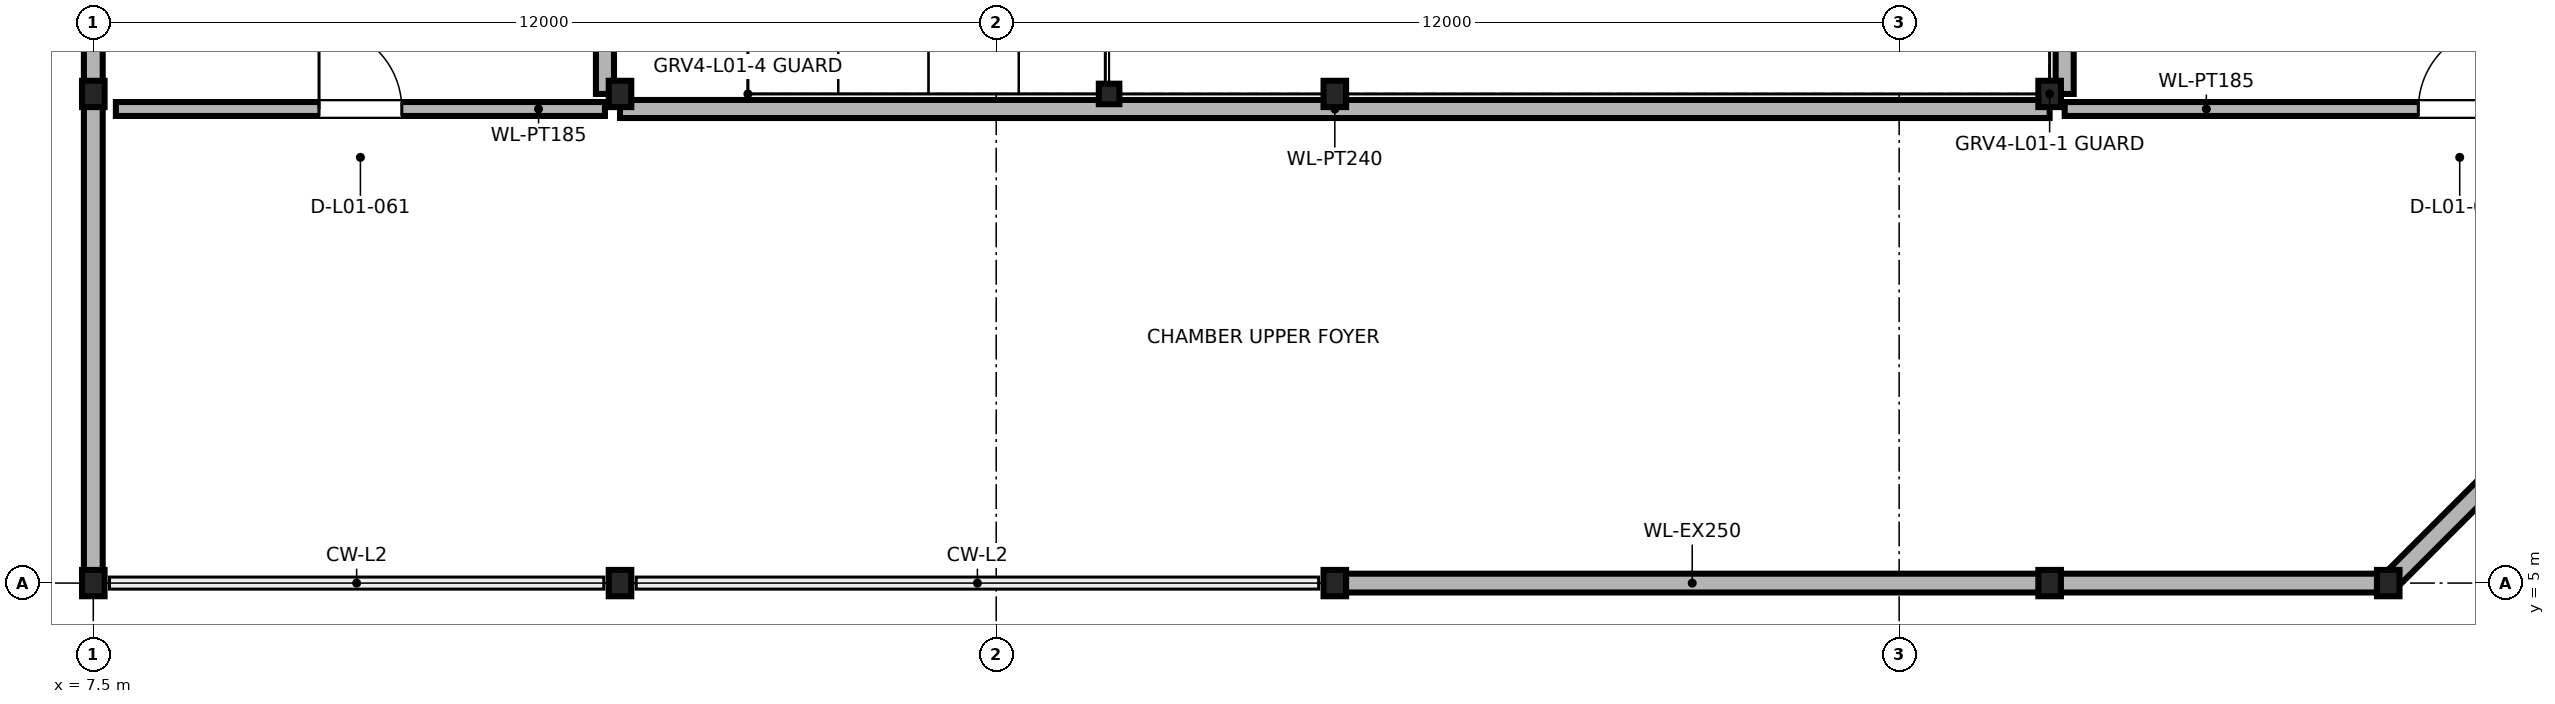
"""IFC4 building model, lengths in metres.
Left out: names, types, materials, properties, quantities, classifications, styles, units other than length and angle.
Written with IfcOpenShell. Run it as: python <this file> out.ifc"""

import sys

from ifc_helpers import new_model, si_unit, direction, frame, frame_2d, origin, origin_2d, place, context, subcontext, project, spatial, rectangle, hollow_circle, i_section, extrude, element, fill, save


model = new_model("IFC4")
c1 = context("Model", 3, precision=1e-05, world=origin(), true_north=direction((0.0, 1.0)))
c2 = subcontext(c1, "Body", "Model", "MODEL_VIEW")
j1 = project(units=[si_unit("LENGTHUNIT", "METRE"), si_unit("PLANEANGLEUNIT", "RADIAN")], contexts=[c1])
p1 = place(None, origin())
s1 = spatial("IfcSite", under=j1, at=p1, CompositionType="ELEMENT")
p2 = place(p1, origin())
s2 = spatial("IfcBuilding", under=s1, at=p2, CompositionType="ELEMENT")
p3 = place(p2, frame((0.0, 0.0, 4.8)))
s3 = spatial("IfcBuildingStorey", under=s2, at=p3, CompositionType="ELEMENT", Elevation=4.8)
for number, where, z_axis, x_axis in (
    (1, (7.5, 5.0, 0.0), (0.0, 0.0, 1.0), (1.0, 0.0, 0.0)),
    (2, (14.5, 5.0, 0.0), (0.0, 0.0, 1.0), (1.0, 0.0, 0.0)),
    (3, (24.0, 5.0, 0.0), (0.0, 0.0, 1.0), (1.0, 0.0, 0.0)),
    (4, (33.5, 5.0, 0.0), (0.0, 0.0, 1.0), (1.0, 0.0, 0.0)),
    (5, (38.0, 5.0, 0.0), (0.0, 0.0, 1.0), (1.0, 0.0, 0.0)),
    (6, (7.5, 11.5, 0.0), (0.0, 0.0, 1.0), (1.0, 0.0, 0.0)),
    (7, (14.5, 11.5, 0.0), (0.0, 0.0, 1.0), (1.0, 0.0, 0.0)),
    (8, (24.0, 11.5, 0.0), (0.0, 0.0, 1.0), (1.0, 0.0, 0.0)),
    (9, (33.5, 11.5, 0.0), (0.0, 0.0, 1.0), (1.0, 0.0, 0.0)),
):
    element("IfcColumn", number, at=place(p3, frame(where, z_axis=z_axis, x_axis=x_axis)), inside=s3, PredefinedType="COLUMN", context=c2, shape_type="SweptSolid", body=[
        extrude(i_section(OverallWidth=0.3, OverallDepth=0.35, WebThickness=0.01, FlangeThickness=0.018, FilletRadius=0.027, at=origin_2d()), origin(), (0.0, 0.0, 1.0), 4.8),
    ])
p4 = place(p3, frame((21.0, 11.5, 0.0), z_axis=(0.0, 0.0, 1.0), x_axis=(1.0, 0.0, 0.0)))
e10 = element("IfcColumn", 10, at=p4, inside=s3, PredefinedType="COLUMN", context=c2, shape_type="SweptSolid", body=[
    extrude(hollow_circle(Radius=0.136, WallThickness=0.016, at=origin_2d()), origin(), (0.0, 0.0, 1.0), 0.96),
])
p5 = place(p3, frame((33.48, 5.0, 0.0), z_axis=(0.0, 0.0, 1.0), x_axis=(-1.0, 0.0, 0.0)))
e11 = element("IfcWall", 11, at=p5, inside=s3, PredefinedType="SOLIDWALL", context=c2, shape_type="SweptSolid", body=[
    extrude(rectangle(XDim=9.46, YDim=0.25, at=frame_2d((4.73, 0.0))), origin(), (0.0, 0.0, 1.0), 4.028),
])
p6 = place(p3, frame((37.98, 5.0, 0.0), z_axis=(0.0, 0.0, 1.0), x_axis=(-1.0, 0.0, 0.0)))
e12 = element("IfcWall", 12, at=p6, inside=s3, PredefinedType="SOLIDWALL", context=c2, shape_type="SweptSolid", body=[
    extrude(rectangle(XDim=4.46, YDim=0.25, at=frame_2d((2.23, 0.0))), origin(), (0.0, 0.0, 1.0), 4.028),
])
p7 = place(p3, frame((44.486, 11.486, 0.0), z_axis=(0.0, 0.0, 1.0), x_axis=(-0.707106781187, -0.707106781187, 0.0)))
e13 = element("IfcWall", 13, at=p7, inside=s3, PredefinedType="SOLIDWALL", context=c2, shape_type="SweptSolid", body=[
    extrude(rectangle(XDim=9.152, YDim=0.25, at=frame_2d((4.576, 0.0))), origin(), (0.0, 0.0, 1.0), 4.028),
])
p8 = place(p3, frame((7.5, 11.52, 0.0), z_axis=(0.0, 0.0, 1.0), x_axis=(0.0, 1.0, 0.0)))
e14 = element("IfcWall", 14, at=p8, inside=s3, PredefinedType="SOLIDWALL", context=c2, shape_type="SweptSolid", body=[
    extrude(rectangle(XDim=12.46, YDim=0.25, at=frame_2d((6.23, 0.0))), origin(), (0.0, 0.0, 1.0), 4.078),
])
p9 = place(p8, frame((4.88, 0.0, 0.85)))
e15 = element("IfcOpeningElement", 15, at=p9, cuts=e14, PredefinedType="OPENING", context=c2, shape_type="SweptSolid", body=[
    extrude(rectangle(XDim=2.7, YDim=1.7, at=frame_2d((1.35, 0.85))), frame((0.0, 0.135, 0.0), z_axis=(0.0, -1.0, 0.0), x_axis=(1.0, 0.0, 0.0)), (0.0, 0.0, 1.0), 0.27),
])
p10 = place(p3, frame((7.5, 5.02, 0.0), z_axis=(0.0, 0.0, 1.0), x_axis=(0.0, 1.0, 0.0)))
e16 = element("IfcWall", 16, at=p10, inside=s3, PredefinedType="SOLIDWALL", context=c2, shape_type="SweptSolid", body=[
    extrude(rectangle(XDim=6.46, YDim=0.25, at=frame_2d((3.23, 0.0))), origin(), (0.0, 0.0, 1.0), 4.078),
])
p11 = place(p3, frame((7.8, 11.3, 0.0), z_axis=(0.0, 0.0, 1.0), x_axis=(1.0, 0.0, 0.0)))
e17 = element("IfcWall", 17, at=p11, inside=s3, PredefinedType="PARTITIONING", context=c2, shape_type="SweptSolid", body=[
    extrude(rectangle(XDim=6.5, YDim=0.185, at=frame_2d((3.25, 0.0))), origin(), (0.0, 0.0, 1.0), 4.08),
])
p12 = place(p11, frame((2.7, 0.0, 0.0)))
e18 = element("IfcOpeningElement", 18, at=p12, cuts=e17, PredefinedType="OPENING", context=c2, shape_type="SweptSolid", body=[
    extrude(rectangle(XDim=1.1, YDim=2.15, at=frame_2d((0.55, 1.075))), frame((0.0, 0.103, 0.0), z_axis=(0.0, -1.0, 0.0), x_axis=(1.0, 0.0, 0.0)), (0.0, 0.0, 1.0), 0.205),
])
p13 = place(p3, frame((14.5, 11.3, 0.0), z_axis=(0.0, 0.0, 1.0), x_axis=(1.0, 0.0, 0.0)))
e19 = element("IfcWall", 19, at=p13, inside=s3, PredefinedType="PARTITIONING", context=c2, shape_type="SweptSolid", body=[
    extrude(rectangle(XDim=19.0, YDim=0.24, at=frame_2d((9.5, 0.0))), origin(), (0.0, 0.0, 1.0), 4.08),
])
p14 = place(p3, frame((33.7, 11.3, 0.0), z_axis=(0.0, 0.0, 1.0), x_axis=(1.0, 0.0, 0.0)))
e20 = element("IfcWall", 20, at=p14, inside=s3, PredefinedType="PARTITIONING", context=c2, shape_type="SweptSolid", body=[
    extrude(rectangle(XDim=10.5, YDim=0.185, at=frame_2d((5.25, 0.0))), origin(), (0.0, 0.0, 1.0), 4.03),
])
p15 = place(p14, frame((4.7, 0.0, 0.0)))
e21 = element("IfcOpeningElement", 21, at=p15, cuts=e20, PredefinedType="OPENING", context=c2, shape_type="SweptSolid", body=[
    extrude(rectangle(XDim=1.1, YDim=2.15, at=frame_2d((0.55, 1.075))), frame((0.0, 0.103, 0.0), z_axis=(0.0, -1.0, 0.0), x_axis=(1.0, 0.0, 0.0)), (0.0, 0.0, 1.0), 0.205),
])
p16 = place(p3, frame((14.3, 11.5, 0.0), z_axis=(0.0, 0.0, 1.0), x_axis=(0.0, 1.0, 0.0)))
e22 = element("IfcWall", 22, at=p16, inside=s3, PredefinedType="PARTITIONING", context=c2, shape_type="SweptSolid", body=[
    extrude(rectangle(XDim=12.5, YDim=0.24, at=frame_2d((6.25, 0.0))), origin(), (0.0, 0.0, 1.0), 4.08),
])
p17 = place(p16, frame((5.425, 0.0, 0.0)))
e23 = element("IfcOpeningElement", 23, at=p17, cuts=e22, PredefinedType="OPENING", context=c2, shape_type="SweptSolid", body=[
    extrude(rectangle(XDim=1.65, YDim=2.2, at=frame_2d((0.825, 1.1))), frame((0.0, 0.13, 0.0), z_axis=(0.0, -1.0, 0.0), x_axis=(1.0, 0.0, 0.0)), (0.0, 0.0, 1.0), 0.26),
])
p18 = place(p3, frame((33.7, 11.5, 0.0), z_axis=(0.0, 0.0, 1.0), x_axis=(0.0, 1.0, 0.0)))
e24 = element("IfcWall", 24, at=p18, inside=s3, PredefinedType="PARTITIONING", context=c2, shape_type="SweptSolid", body=[
    extrude(rectangle(XDim=12.5, YDim=0.24, at=frame_2d((6.25, 0.0))), origin(), (0.0, 0.0, 1.0), 4.08),
])
p19 = place(p12, origin())
e25 = element("IfcDoor", 25, at=p19, inside=s3, OperationType="SINGLE_SWING_LEFT", PredefinedType="DOOR", context=c2, shape_type="SweptSolid", body=[
    extrude(rectangle(XDim=1.1, YDim=2.15, at=frame_2d((0.55, 1.075))), frame((0.0, 0.025, 0.0), z_axis=(0.0, -1.0, 0.0), x_axis=(1.0, 0.0, 0.0)), (0.0, 0.0, 1.0), 0.05),
])
fill(e18, e25)
p20 = place(p15, origin())
e26 = element("IfcDoor", 26, at=p20, inside=s3, OperationType="SINGLE_SWING_RIGHT", PredefinedType="DOOR", context=c2, shape_type="SweptSolid", body=[
    extrude(rectangle(XDim=1.1, YDim=2.15, at=frame_2d((0.55, 1.075))), frame((0.0, 0.025, 0.0), z_axis=(0.0, -1.0, 0.0), x_axis=(1.0, 0.0, 0.0)), (0.0, 0.0, 1.0), 0.05),
])
fill(e21, e26)
save(model, sys.argv[1])
